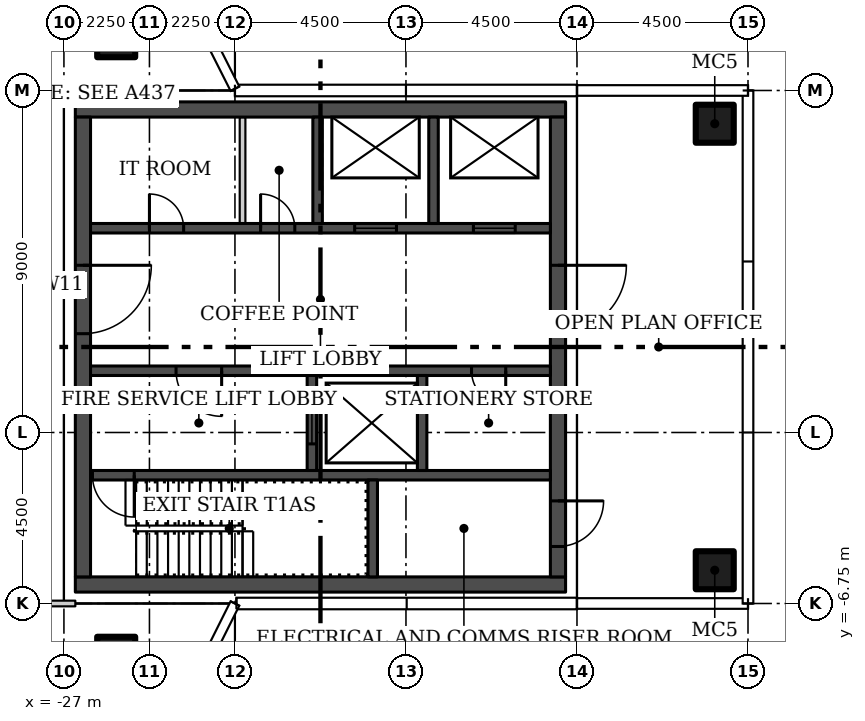
"""IFC4 building model, lengths in metres.
Left out: names, types, materials, properties, quantities, classifications, styles, units other than length and angle.
Written with IfcOpenShell. Run it as: python <this file> out.ifc"""

import sys

from ifc_helpers import new_model, si_unit, direction, frame, frame_2d, origin, origin_2d, place, context, subcontext, project, spatial, rectangle, hollow_rectangle, extrude, element, fill, save


model = new_model("IFC4")
c1 = context("Model", 3, precision=1e-05, world=origin(), true_north=direction((0.0, 1.0)))
c2 = subcontext(c1, "Body", "Model", "MODEL_VIEW")
j1 = project(units=[si_unit("LENGTHUNIT", "METRE"), si_unit("PLANEANGLEUNIT", "RADIAN")], contexts=[c1])
p1 = place(None, origin())
s1 = spatial("IfcSite", under=j1, at=p1, CompositionType="ELEMENT")
p2 = place(p1, origin())
s2 = spatial("IfcBuilding", under=s1, at=p2, CompositionType="ELEMENT")
p3 = place(p2, frame((0.0, 0.0, 221.7)))
s3 = spatial("IfcBuildingStorey", under=s2, at=p3, CompositionType="ELEMENT", Elevation=221.7)
for number, where in (
    (1, (-25.625, 8.125, 0.0)),
    (2, (-25.625, -8.125, 0.0)),
    (3, (-9.875, -5.875, 0.0)),
    (4, (-9.875, 5.875, 0.0)),
):
    element("IfcColumn", number, at=place(p3, frame(where)), inside=s3, PredefinedType="COLUMN", context=c2, shape_type="SweptSolid", body=[
        extrude(hollow_rectangle(XDim=1.0, YDim=1.0, WallThickness=0.04, at=origin_2d()), origin(), (0.0, 0.0, 1.0), 3.45),
    ])
p4 = place(p3, frame((-40.8, 6.75, 0.0)))
e5 = element("IfcWall", 5, at=p4, inside=s3, PredefinedType="PARTITIONING", context=c2, shape_type="SweptSolid", body=[
    extrude(rectangle(XDim=14.1, YDim=0.15, at=frame_2d((7.05, 0.0))), origin(), (0.0, 0.0, 1.0), 3.45),
])
p5 = place(p4, frame((6.3, 0.0, 0.0)))
e6 = element("IfcOpeningElement", 6, at=p5, cuts=e5, PredefinedType="OPENING", context=c2, shape_type="SweptSolid", body=[
    extrude(rectangle(XDim=1.5, YDim=2.1, at=frame_2d((0.75, 1.05))), frame((0.0, 0.085, 0.0), z_axis=(0.0, -1.0, 0.0), x_axis=(1.0, 0.0, 0.0)), (0.0, 0.0, 1.0), 0.17),
])
p6 = place(p3, frame((-26.7, -6.75, 0.0), z_axis=(0.0, 0.0, 1.0), x_axis=(-1.0, 0.0, 0.0)))
e7 = element("IfcWall", 7, at=p6, inside=s3, PredefinedType="PARTITIONING", context=c2, shape_type="SweptSolid", body=[
    extrude(rectangle(XDim=14.1, YDim=0.15, at=frame_2d((7.05, 0.0))), origin(), (0.0, 0.0, 1.0), 3.45),
])
p7 = place(p6, frame((6.3, 0.0, 0.0)))
e8 = element("IfcOpeningElement", 8, at=p7, cuts=e7, PredefinedType="OPENING", context=c2, shape_type="SweptSolid", body=[
    extrude(rectangle(XDim=1.5, YDim=2.1, at=frame_2d((0.75, 1.05))), frame((0.0, 0.085, 0.0), z_axis=(0.0, -1.0, 0.0), x_axis=(1.0, 0.0, 0.0)), (0.0, 0.0, 1.0), 0.17),
])
for number, where in (
    (9, (-26.7, -6.25, 0.0)),
    (10, (-26.7, 6.25, 0.0)),
):
    element("IfcWall", number, at=place(p3, frame(where)), inside=s3, PredefinedType="SHEAR", context=c2, shape_type="SweptSolid", body=[
        extrude(rectangle(XDim=12.9, YDim=0.4, at=frame_2d((6.45, 0.0))), origin(), (0.0, 0.0, 1.0), 3.45),
    ])
p8 = place(p3, frame((-26.5, 6.05, 0.0), z_axis=(0.0, 0.0, 1.0), x_axis=(0.0, -1.0, 0.0)))
e11 = element("IfcWall", 11, at=p8, inside=s3, PredefinedType="SHEAR", context=c2, shape_type="SweptSolid", body=[
    extrude(rectangle(XDim=12.1, YDim=0.4, at=frame_2d((6.05, 0.0))), origin(), (0.0, 0.0, 1.0), 3.45),
])
p9 = place(p8, frame((3.9, 0.0, 0.0)))
e12 = element("IfcOpeningElement", 12, at=p9, cuts=e11, PredefinedType="OPENING", context=c2, shape_type="SweptSolid", body=[
    extrude(rectangle(XDim=1.8, YDim=2.4, at=frame_2d((0.9, 1.2))), frame((0.0, 0.21, 0.0), z_axis=(0.0, -1.0, 0.0), x_axis=(1.0, 0.0, 0.0)), (0.0, 0.0, 1.0), 0.42),
])
p10 = place(p3, frame((-14.0, 6.05, 0.0), z_axis=(0.0, 0.0, 1.0), x_axis=(0.0, -1.0, 0.0)))
e13 = element("IfcWall", 13, at=p10, inside=s3, PredefinedType="SHEAR", context=c2, shape_type="SweptSolid", body=[
    extrude(rectangle(XDim=12.1, YDim=0.4, at=frame_2d((6.05, 0.0))), origin(), (0.0, 0.0, 1.0), 3.45),
])
p11 = place(p10, frame((10.1, 0.0, 0.0)))
e14 = element("IfcOpeningElement", 14, at=p11, cuts=e13, PredefinedType="OPENING", context=c2, shape_type="SweptSolid", body=[
    extrude(rectangle(XDim=1.2, YDim=2.1, at=frame_2d((0.6, 1.05))), frame((0.0, 0.21, 0.0), z_axis=(0.0, -1.0, 0.0), x_axis=(1.0, 0.0, 0.0)), (0.0, 0.0, 1.0), 0.42),
])
p12 = place(p10, frame((3.9, 0.0, 0.0)))
e15 = element("IfcOpeningElement", 15, at=p12, cuts=e13, PredefinedType="OPENING", context=c2, shape_type="SweptSolid", body=[
    extrude(rectangle(XDim=1.8, YDim=2.4, at=frame_2d((0.9, 1.2))), frame((0.0, 0.21, 0.0), z_axis=(0.0, -1.0, 0.0), x_axis=(1.0, 0.0, 0.0)), (0.0, 0.0, 1.0), 0.42),
])
p13 = place(p3, frame((-14.2, -3.375, 0.0), z_axis=(0.0, 0.0, 1.0), x_axis=(-1.0, 0.0, 0.0)))
e16 = element("IfcWall", 16, at=p13, inside=s3, PredefinedType="SHEAR", context=c2, shape_type="SweptSolid", body=[
    extrude(rectangle(XDim=12.1, YDim=0.25, at=frame_2d((6.05, 0.0))), origin(), (0.0, 0.0, 1.0), 3.45),
])
p14 = place(p13, frame((10.95, 0.0, 0.0)))
e17 = element("IfcOpeningElement", 17, at=p14, cuts=e16, PredefinedType="OPENING", context=c2, shape_type="SweptSolid", body=[
    extrude(rectangle(XDim=1.1, YDim=2.1, at=frame_2d((0.55, 1.05))), frame((0.0, 0.135, 0.0), z_axis=(0.0, -1.0, 0.0), x_axis=(1.0, 0.0, 0.0)), (0.0, 0.0, 1.0), 0.27),
])
p15 = place(p3, frame((-18.875, -6.05, 0.0), z_axis=(0.0, 0.0, 1.0), x_axis=(0.0, 1.0, 0.0)))
e18 = element("IfcWall", 18, at=p15, inside=s3, PredefinedType="SHEAR", context=c2, shape_type="SweptSolid", body=[
    extrude(rectangle(XDim=2.55, YDim=0.25, at=frame_2d((1.275, 0.0))), origin(), (0.0, 0.0, 1.0), 3.45),
])
p16 = place(p3, frame((-14.2, -0.625, 0.0), z_axis=(0.0, 0.0, 1.0), x_axis=(-1.0, 0.0, 0.0)))
e19 = element("IfcWall", 19, at=p16, inside=s3, PredefinedType="SHEAR", context=c2, shape_type="SweptSolid", body=[
    extrude(rectangle(XDim=12.1, YDim=0.25, at=frame_2d((6.05, 0.0))), origin(), (0.0, 0.0, 1.0), 3.45),
])
p17 = place(p16, frame((8.65, 0.0, 0.0)))
e20 = element("IfcOpeningElement", 20, at=p17, cuts=e19, PredefinedType="OPENING", context=c2, shape_type="SweptSolid", body=[
    extrude(rectangle(XDim=1.2, YDim=2.1, at=frame_2d((0.6, 1.05))), frame((0.0, 0.135, 0.0), z_axis=(0.0, -1.0, 0.0), x_axis=(1.0, 0.0, 0.0)), (0.0, 0.0, 1.0), 0.27),
])
p18 = place(p16, frame((1.175, 0.0, 0.0)))
e21 = element("IfcOpeningElement", 21, at=p18, cuts=e19, PredefinedType="OPENING", context=c2, shape_type="SweptSolid", body=[
    extrude(rectangle(XDim=0.9, YDim=2.1, at=frame_2d((0.45, 1.05))), frame((0.0, 0.135, 0.0), z_axis=(0.0, -1.0, 0.0), x_axis=(1.0, 0.0, 0.0)), (0.0, 0.0, 1.0), 0.27),
])
p19 = place(p3, frame((-20.475, -3.25, 0.0), z_axis=(0.0, 0.0, 1.0), x_axis=(0.0, 1.0, 0.0)))
e22 = element("IfcWall", 22, at=p19, inside=s3, PredefinedType="SHEAR", context=c2, shape_type="SweptSolid", body=[
    extrude(rectangle(XDim=2.5, YDim=0.25, at=frame_2d((1.25, 0.0))), origin(), (0.0, 0.0, 1.0), 3.45),
])
p20 = place(p19, frame((0.7, 0.0, 0.0)))
e23 = element("IfcOpeningElement", 23, at=p20, cuts=e22, PredefinedType="OPENING", context=c2, shape_type="SweptSolid", body=[
    extrude(rectangle(XDim=1.1, YDim=2.1, at=frame_2d((0.55, 1.05))), frame((0.0, 0.135, 0.0), z_axis=(0.0, -1.0, 0.0), x_axis=(1.0, 0.0, 0.0)), (0.0, 0.0, 1.0), 0.27),
])
p21 = place(p3, frame((-17.575, -3.25, 0.0), z_axis=(0.0, 0.0, 1.0), x_axis=(0.0, 1.0, 0.0)))
e24 = element("IfcWall", 24, at=p21, inside=s3, PredefinedType="SHEAR", context=c2, shape_type="SweptSolid", body=[
    extrude(rectangle(XDim=2.5, YDim=0.25, at=frame_2d((1.25, 0.0))), origin(), (0.0, 0.0, 1.0), 3.45),
])
p22 = place(p3, frame((-26.3, 3.125, 0.0)))
e25 = element("IfcWall", 25, at=p22, inside=s3, PredefinedType="SHEAR", context=c2, shape_type="SweptSolid", body=[
    extrude(rectangle(XDim=12.1, YDim=0.25, at=frame_2d((6.05, 0.0))), origin(), (0.0, 0.0, 1.0), 3.45),
])
p23 = place(p22, frame((6.95, 0.0, 0.0)))
e26 = element("IfcOpeningElement", 26, at=p23, cuts=e25, PredefinedType="OPENING", context=c2, shape_type="SweptSolid", body=[
    extrude(rectangle(XDim=1.1, YDim=2.1, at=frame_2d((0.55, 1.05))), frame((0.0, 0.135, 0.0), z_axis=(0.0, -1.0, 0.0), x_axis=(1.0, 0.0, 0.0)), (0.0, 0.0, 1.0), 0.27),
])
p24 = place(p22, frame((10.075, 0.0, 0.0)))
e27 = element("IfcOpeningElement", 27, at=p24, cuts=e25, PredefinedType="OPENING", context=c2, shape_type="SweptSolid", body=[
    extrude(rectangle(XDim=1.1, YDim=2.1, at=frame_2d((0.55, 1.05))), frame((0.0, 0.135, 0.0), z_axis=(0.0, -1.0, 0.0), x_axis=(1.0, 0.0, 0.0)), (0.0, 0.0, 1.0), 0.27),
])
p25 = place(p22, frame((1.55, 0.0, 0.0)))
e28 = element("IfcOpeningElement", 28, at=p25, cuts=e25, PredefinedType="OPENING", context=c2, shape_type="SweptSolid", body=[
    extrude(rectangle(XDim=0.9, YDim=2.1, at=frame_2d((0.45, 1.05))), frame((0.0, 0.135, 0.0), z_axis=(0.0, -1.0, 0.0), x_axis=(1.0, 0.0, 0.0)), (0.0, 0.0, 1.0), 0.27),
])
p26 = place(p22, frame((4.475, 0.0, 0.0)))
e29 = element("IfcOpeningElement", 29, at=p26, cuts=e25, PredefinedType="OPENING", context=c2, shape_type="SweptSolid", body=[
    extrude(rectangle(XDim=0.9, YDim=2.1, at=frame_2d((0.45, 1.05))), frame((0.0, 0.135, 0.0), z_axis=(0.0, -1.0, 0.0), x_axis=(1.0, 0.0, 0.0)), (0.0, 0.0, 1.0), 0.27),
])
for number, where, z_axis, x_axis in (
    (30, (-20.325, 3.25, 0.0), (0.0, 0.0, 1.0), (0.0, 1.0, 0.0)),
    (31, (-17.275, 3.25, 0.0), (0.0, 0.0, 1.0), (0.0, 1.0, 0.0)),
):
    element("IfcWall", number, at=place(p3, frame(where, z_axis=z_axis, x_axis=x_axis)), inside=s3, PredefinedType="SHEAR", context=c2, shape_type="SweptSolid", body=[
        extrude(rectangle(XDim=2.8, YDim=0.25, at=frame_2d((1.4, 0.0))), origin(), (0.0, 0.0, 1.0), 3.45),
    ])
p27 = place(p3, frame((-22.3, 3.25, 0.0), z_axis=(0.0, 0.0, 1.0), x_axis=(0.0, 1.0, 0.0)))
e32 = element("IfcWall", 32, at=p27, inside=s3, PredefinedType="PARTITIONING", context=c2, shape_type="SweptSolid", body=[
    extrude(rectangle(XDim=2.8, YDim=0.15, at=frame_2d((1.4, 0.0))), origin(), (0.0, 0.0, 1.0), 3.45),
])
p28 = place(p9, origin())
e33 = element("IfcDoor", 33, at=p28, inside=s3, OperationType="DOUBLE_DOOR_SINGLE_SWING", PredefinedType="DOOR", context=c2, shape_type="SweptSolid", body=[
    extrude(rectangle(XDim=1.8, YDim=2.4, at=frame_2d((0.9, 1.2))), frame((0.0, 0.025, 0.0), z_axis=(0.0, -1.0, 0.0), x_axis=(1.0, 0.0, 0.0)), (0.0, 0.0, 1.0), 0.05),
])
fill(e12, e33)
p29 = place(p11, origin())
e34 = element("IfcDoor", 34, at=p29, inside=s3, OperationType="SINGLE_SWING_RIGHT", PredefinedType="DOOR", context=c2, shape_type="SweptSolid", body=[
    extrude(rectangle(XDim=1.2, YDim=2.1, at=frame_2d((0.6, 1.05))), frame((0.0, 0.025, 0.0), z_axis=(0.0, -1.0, 0.0), x_axis=(1.0, 0.0, 0.0)), (0.0, 0.0, 1.0), 0.05),
])
fill(e14, e34)
p30 = place(p12, origin())
e35 = element("IfcDoor", 35, at=p30, inside=s3, OperationType="DOUBLE_DOOR_SINGLE_SWING", PredefinedType="DOOR", context=c2, shape_type="SweptSolid", body=[
    extrude(rectangle(XDim=1.8, YDim=2.4, at=frame_2d((0.9, 1.2))), frame((0.0, 0.025, 0.0), z_axis=(0.0, -1.0, 0.0), x_axis=(1.0, 0.0, 0.0)), (0.0, 0.0, 1.0), 0.05),
])
fill(e15, e35)
p31 = place(p14, origin())
e36 = element("IfcDoor", 36, at=p31, inside=s3, OperationType="SINGLE_SWING_RIGHT", PredefinedType="DOOR", context=c2, shape_type="SweptSolid", body=[
    extrude(rectangle(XDim=1.1, YDim=2.1, at=frame_2d((0.55, 1.05))), frame((0.0, 0.025, 0.0), z_axis=(0.0, -1.0, 0.0), x_axis=(1.0, 0.0, 0.0)), (0.0, 0.0, 1.0), 0.05),
])
fill(e17, e36)
p32 = place(p17, origin())
e37 = element("IfcDoor", 37, at=p32, inside=s3, OperationType="SINGLE_SWING_RIGHT", PredefinedType="DOOR", context=c2, shape_type="SweptSolid", body=[
    extrude(rectangle(XDim=1.2, YDim=2.1, at=frame_2d((0.6, 1.05))), frame((0.0, 0.025, 0.0), z_axis=(0.0, -1.0, 0.0), x_axis=(1.0, 0.0, 0.0)), (0.0, 0.0, 1.0), 0.05),
])
fill(e20, e37)
p33 = place(p18, origin())
e38 = element("IfcDoor", 38, at=p33, inside=s3, OperationType="SINGLE_SWING_LEFT", PredefinedType="DOOR", context=c2, shape_type="SweptSolid", body=[
    extrude(rectangle(XDim=0.9, YDim=2.1, at=frame_2d((0.45, 1.05))), frame((0.0, 0.025, 0.0), z_axis=(0.0, -1.0, 0.0), x_axis=(1.0, 0.0, 0.0)), (0.0, 0.0, 1.0), 0.05),
])
fill(e21, e38)
p34 = place(p20, origin())
e39 = element("IfcDoor", 39, at=p34, inside=s3, OperationType="SLIDING_TO_LEFT", PredefinedType="DOOR", context=c2, shape_type="SweptSolid", body=[
    extrude(rectangle(XDim=1.1, YDim=2.1, at=frame_2d((0.55, 1.05))), frame((0.0, 0.025, 0.0), z_axis=(0.0, -1.0, 0.0), x_axis=(1.0, 0.0, 0.0)), (0.0, 0.0, 1.0), 0.05),
])
fill(e23, e39)
p35 = place(p23, origin())
e40 = element("IfcDoor", 40, at=p35, inside=s3, OperationType="SLIDING_TO_LEFT", PredefinedType="DOOR", context=c2, shape_type="SweptSolid", body=[
    extrude(rectangle(XDim=1.1, YDim=2.1, at=frame_2d((0.55, 1.05))), frame((0.0, 0.025, 0.0), z_axis=(0.0, -1.0, 0.0), x_axis=(1.0, 0.0, 0.0)), (0.0, 0.0, 1.0), 0.05),
])
fill(e26, e40)
p36 = place(p24, origin())
e41 = element("IfcDoor", 41, at=p36, inside=s3, OperationType="SLIDING_TO_LEFT", PredefinedType="DOOR", context=c2, shape_type="SweptSolid", body=[
    extrude(rectangle(XDim=1.1, YDim=2.1, at=frame_2d((0.55, 1.05))), frame((0.0, 0.025, 0.0), z_axis=(0.0, -1.0, 0.0), x_axis=(1.0, 0.0, 0.0)), (0.0, 0.0, 1.0), 0.05),
])
fill(e27, e41)
p37 = place(p25, origin())
e42 = element("IfcDoor", 42, at=p37, inside=s3, OperationType="SINGLE_SWING_LEFT", PredefinedType="DOOR", context=c2, shape_type="SweptSolid", body=[
    extrude(rectangle(XDim=0.9, YDim=2.1, at=frame_2d((0.45, 1.05))), frame((0.0, 0.025, 0.0), z_axis=(0.0, -1.0, 0.0), x_axis=(1.0, 0.0, 0.0)), (0.0, 0.0, 1.0), 0.05),
])
fill(e28, e42)
p38 = place(p26, origin())
e43 = element("IfcDoor", 43, at=p38, inside=s3, OperationType="SINGLE_SWING_LEFT", PredefinedType="DOOR", context=c2, shape_type="SweptSolid", body=[
    extrude(rectangle(XDim=0.9, YDim=2.1, at=frame_2d((0.45, 1.05))), frame((0.0, 0.025, 0.0), z_axis=(0.0, -1.0, 0.0), x_axis=(1.0, 0.0, 0.0)), (0.0, 0.0, 1.0), 0.05),
])
fill(e29, e43)
save(model, sys.argv[1])
